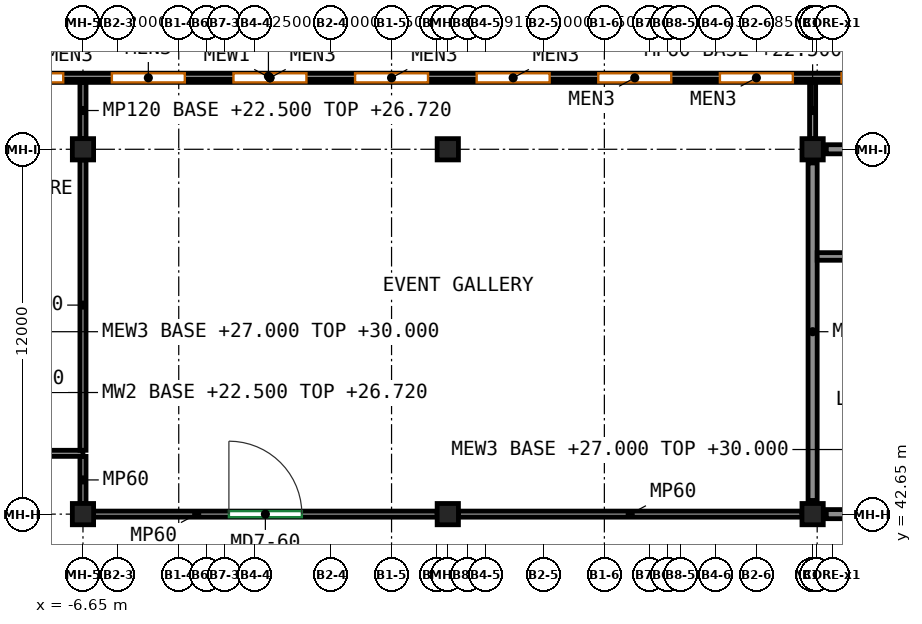
"""IFC4 building model, lengths in metres.
Left out: names, types, materials, properties, quantities, classifications, styles, units other than length and angle.
Written with IfcOpenShell. Run it as: python <this file> out.ifc"""

import sys

from ifc_helpers import new_model, si_unit, direction, frame, frame_2d, origin, origin_2d, place, context, subcontext, project, spatial, rectangle, extrude, source, transform, mapped, element, fill, save


model = new_model("IFC4")
c1 = context("Model", 3, precision=1e-05, world=origin(), true_north=direction((0.0, 1.0)))
c2 = subcontext(c1, "Body", "Model", "MODEL_VIEW")
j1 = project(units=[si_unit("LENGTHUNIT", "METRE"), si_unit("PLANEANGLEUNIT", "RADIAN")], contexts=[c1])
p1 = place(None, origin())
s1 = spatial("IfcSite", under=j1, at=p1, CompositionType="ELEMENT")
p2 = place(p1, origin())
s2 = spatial("IfcBuilding", under=s1, at=p2, CompositionType="ELEMENT")
p3 = place(p2, frame((0.0, 0.0, 22.5)))
s3 = spatial("IfcBuildingStorey", under=s2, at=p3, CompositionType="ELEMENT", Elevation=22.5)
m1 = source(origin(), c2, "Body", "SweptSolid", [
    extrude(rectangle(XDim=0.7, YDim=0.7, at=origin_2d()), origin(), (0.0, 0.0, 1.0), 4.22),
])
for number, where, z_axis, x_axis in (
    (1, (-6.65, 42.65, 0.0), (0.0, 0.0, 1.0), (1.0, 0.0, 0.0)),
    (2, (-6.65, 54.65, 0.0), (0.0, 0.0, 1.0), (1.0, 0.0, 0.0)),
    (3, (5.35, 42.65, 0.0), (0.0, 0.0, 1.0), (1.0, 0.0, 0.0)),
    (4, (5.35, 54.65, 0.0), (0.0, 0.0, 1.0), (1.0, 0.0, 0.0)),
    (5, (17.35, 42.65, 0.0), (0.0, 0.0, 1.0), (1.0, 0.0, 0.0)),
    (6, (17.35, 54.65, 0.0), (0.0, 0.0, 1.0), (1.0, 0.0, 0.0)),
):
    element("IfcColumn", number, at=place(p3, frame(where, z_axis=z_axis, x_axis=x_axis)), inside=s3, PredefinedType="COLUMN", context=c2, shape_type="MappedRepresentation", body=[
        mapped(m1, transform((0.0, 0.0, 0.0))),
    ])
m2 = source(origin(), c2, "Body", "SweptSolid", [
    extrude(rectangle(XDim=12.4, YDim=0.3, at=frame_2d((6.2, 0.0))), origin(), (0.0, 0.0, 1.0), 3.42),
])
p4 = place(p3, frame((30.2, 54.65, 0.0), z_axis=(0.0, 0.0, 1.0), x_axis=(-1.0, 0.0, 0.0)))
e7 = element("IfcWall", 7, at=p4, inside=s3, PredefinedType="SHEAR", context=c2, shape_type="MappedRepresentation", body=[
    mapped(m2, transform((0.0, 0.0, 0.0))),
])
p5 = place(p4, frame((5.7, 0.0, 0.0)))
e8 = element("IfcOpeningElement", 8, at=p5, cuts=e7, PredefinedType="OPENING", context=c2, shape_type="SweptSolid", body=[
    extrude(rectangle(XDim=1.0, YDim=2.1, at=frame_2d((0.5, 1.05))), frame((0.0, 0.16, 0.0), z_axis=(0.0, -1.0, 0.0), x_axis=(1.0, 0.0, 0.0)), (0.0, 0.0, 1.0), 0.32),
])
p6 = place(p3, frame((30.2, 42.65, 0.0), z_axis=(0.0, 0.0, 1.0), x_axis=(-1.0, 0.0, 0.0)))
e9 = element("IfcWall", 9, at=p6, inside=s3, PredefinedType="SHEAR", context=c2, shape_type="MappedRepresentation", body=[
    mapped(m2, transform((0.0, 0.0, 0.0))),
])
p7 = place(p6, frame((5.2, 0.0, 0.0)))
e10 = element("IfcOpeningElement", 10, at=p7, cuts=e9, PredefinedType="OPENING", context=c2, shape_type="SweptSolid", body=[
    extrude(rectangle(XDim=2.0, YDim=2.4, at=frame_2d((1.0, 1.2))), frame((0.0, 0.16, 0.0), z_axis=(0.0, -1.0, 0.0), x_axis=(1.0, 0.0, 0.0)), (0.0, 0.0, 1.0), 0.32),
])
m3 = source(origin(), c2, "Body", "SweptSolid", [
    extrude(rectangle(XDim=11.1, YDim=0.3, at=frame_2d((5.55, 0.0))), origin(), (0.0, 0.0, 1.0), 3.42),
])
p8 = place(p3, frame((17.35, 54.2, 0.0), z_axis=(0.0, 0.0, 1.0), x_axis=(0.0, -1.0, 0.0)))
e11 = element("IfcWall", 11, at=p8, inside=s3, PredefinedType="SHEAR", context=c2, shape_type="MappedRepresentation", body=[
    mapped(m3, transform((0.0, 0.0, 0.0))),
])
m4 = source(origin(), c2, "Body", "SweptSolid", [
    extrude(rectangle(XDim=4.15, YDim=0.25, at=frame_2d((2.075, 0.0))), origin(), (0.0, 0.0, 1.0), 4.22),
])
p9 = place(p3, frame((21.65, 51.125, 0.0), z_axis=(0.0, 0.0, 1.0), x_axis=(-1.0, 0.0, 0.0)))
e12 = element("IfcWall", 12, at=p9, inside=s3, PredefinedType="SHEAR", context=c2, shape_type="MappedRepresentation", body=[
    mapped(m4, transform((0.0, 0.0, 0.0))),
])
p10 = place(p9, frame((1.4, 0.0, 0.0)))
e13 = element("IfcOpeningElement", 13, at=p10, cuts=e12, PredefinedType="OPENING", context=c2, shape_type="SweptSolid", body=[
    extrude(rectangle(XDim=1.1, YDim=2.1, at=frame_2d((0.55, 1.05))), frame((0.0, 0.135, 0.0), z_axis=(0.0, -1.0, 0.0), x_axis=(1.0, 0.0, 0.0)), (0.0, 0.0, 1.0), 0.27),
])
m5 = source(origin(), c2, "Body", "SweptSolid", [
    extrude(rectangle(XDim=112.7, YDim=0.3, at=frame_2d((56.35, 0.0))), origin(), (0.0, 0.0, 1.0), 4.22),
])
p11 = place(p3, frame((-56.85, 57.0, 0.0), z_axis=(0.0, 0.0, 1.0), x_axis=(1.0, 0.0, 0.0)))
e14 = element("IfcWall", 14, at=p11, inside=s3, PredefinedType="SOLIDWALL", context=c2, shape_type="MappedRepresentation", body=[
    mapped(m5, transform((0.0, 0.0, 0.0))),
])
p12 = place(p11, frame((3.15, 0.0, 0.9)))
e15 = element("IfcOpeningElement", 15, at=p12, cuts=e14, PredefinedType="OPENING", context=c2, shape_type="SweptSolid", body=[
    extrude(rectangle(XDim=2.4, YDim=1.8, at=frame_2d((1.2, 0.9))), frame((0.0, 0.16, 0.0), z_axis=(0.0, -1.0, 0.0), x_axis=(1.0, 0.0, 0.0)), (0.0, 0.0, 1.0), 0.32),
])
p13 = place(p11, frame((7.15, 0.0, 0.9)))
e16 = element("IfcOpeningElement", 16, at=p13, cuts=e14, PredefinedType="OPENING", context=c2, shape_type="SweptSolid", body=[
    extrude(rectangle(XDim=2.4, YDim=1.8, at=frame_2d((1.2, 0.9))), frame((0.0, 0.16, 0.0), z_axis=(0.0, -1.0, 0.0), x_axis=(1.0, 0.0, 0.0)), (0.0, 0.0, 1.0), 0.32),
])
p14 = place(p11, frame((11.15, 0.0, 0.9)))
e17 = element("IfcOpeningElement", 17, at=p14, cuts=e14, PredefinedType="OPENING", context=c2, shape_type="SweptSolid", body=[
    extrude(rectangle(XDim=2.4, YDim=1.8, at=frame_2d((1.2, 0.9))), frame((0.0, 0.16, 0.0), z_axis=(0.0, -1.0, 0.0), x_axis=(1.0, 0.0, 0.0)), (0.0, 0.0, 1.0), 0.32),
])
p15 = place(p11, frame((15.15, 0.0, 0.9)))
e18 = element("IfcOpeningElement", 18, at=p15, cuts=e14, PredefinedType="OPENING", context=c2, shape_type="SweptSolid", body=[
    extrude(rectangle(XDim=2.4, YDim=1.8, at=frame_2d((1.2, 0.9))), frame((0.0, 0.16, 0.0), z_axis=(0.0, -1.0, 0.0), x_axis=(1.0, 0.0, 0.0)), (0.0, 0.0, 1.0), 0.32),
])
p16 = place(p11, frame((19.15, 0.0, 0.9)))
e19 = element("IfcOpeningElement", 19, at=p16, cuts=e14, PredefinedType="OPENING", context=c2, shape_type="SweptSolid", body=[
    extrude(rectangle(XDim=2.4, YDim=1.8, at=frame_2d((1.2, 0.9))), frame((0.0, 0.16, 0.0), z_axis=(0.0, -1.0, 0.0), x_axis=(1.0, 0.0, 0.0)), (0.0, 0.0, 1.0), 0.32),
])
p17 = place(p11, frame((23.15, 0.0, 0.9)))
e20 = element("IfcOpeningElement", 20, at=p17, cuts=e14, PredefinedType="OPENING", context=c2, shape_type="SweptSolid", body=[
    extrude(rectangle(XDim=2.4, YDim=1.8, at=frame_2d((1.2, 0.9))), frame((0.0, 0.16, 0.0), z_axis=(0.0, -1.0, 0.0), x_axis=(1.0, 0.0, 0.0)), (0.0, 0.0, 1.0), 0.32),
])
p18 = place(p11, frame((27.15, 0.0, 0.9)))
e21 = element("IfcOpeningElement", 21, at=p18, cuts=e14, PredefinedType="OPENING", context=c2, shape_type="SweptSolid", body=[
    extrude(rectangle(XDim=2.4, YDim=1.8, at=frame_2d((1.2, 0.9))), frame((0.0, 0.16, 0.0), z_axis=(0.0, -1.0, 0.0), x_axis=(1.0, 0.0, 0.0)), (0.0, 0.0, 1.0), 0.32),
])
p19 = place(p11, frame((31.15, 0.0, 0.9)))
e22 = element("IfcOpeningElement", 22, at=p19, cuts=e14, PredefinedType="OPENING", context=c2, shape_type="SweptSolid", body=[
    extrude(rectangle(XDim=2.4, YDim=1.8, at=frame_2d((1.2, 0.9))), frame((0.0, 0.16, 0.0), z_axis=(0.0, -1.0, 0.0), x_axis=(1.0, 0.0, 0.0)), (0.0, 0.0, 1.0), 0.32),
])
p20 = place(p11, frame((35.15, 0.0, 0.9)))
e23 = element("IfcOpeningElement", 23, at=p20, cuts=e14, PredefinedType="OPENING", context=c2, shape_type="SweptSolid", body=[
    extrude(rectangle(XDim=2.4, YDim=1.8, at=frame_2d((1.2, 0.9))), frame((0.0, 0.16, 0.0), z_axis=(0.0, -1.0, 0.0), x_axis=(1.0, 0.0, 0.0)), (0.0, 0.0, 1.0), 0.32),
])
p21 = place(p11, frame((43.15, 0.0, 0.9)))
e24 = element("IfcOpeningElement", 24, at=p21, cuts=e14, PredefinedType="OPENING", context=c2, shape_type="SweptSolid", body=[
    extrude(rectangle(XDim=2.4, YDim=1.8, at=frame_2d((1.2, 0.9))), frame((0.0, 0.16, 0.0), z_axis=(0.0, -1.0, 0.0), x_axis=(1.0, 0.0, 0.0)), (0.0, 0.0, 1.0), 0.32),
])
p22 = place(p11, frame((47.15, 0.0, 0.9)))
e25 = element("IfcOpeningElement", 25, at=p22, cuts=e14, PredefinedType="OPENING", context=c2, shape_type="SweptSolid", body=[
    extrude(rectangle(XDim=2.4, YDim=1.8, at=frame_2d((1.2, 0.9))), frame((0.0, 0.16, 0.0), z_axis=(0.0, -1.0, 0.0), x_axis=(1.0, 0.0, 0.0)), (0.0, 0.0, 1.0), 0.32),
])
p23 = place(p11, frame((51.15, 0.0, 0.9)))
e26 = element("IfcOpeningElement", 26, at=p23, cuts=e14, PredefinedType="OPENING", context=c2, shape_type="SweptSolid", body=[
    extrude(rectangle(XDim=2.4, YDim=1.8, at=frame_2d((1.2, 0.9))), frame((0.0, 0.16, 0.0), z_axis=(0.0, -1.0, 0.0), x_axis=(1.0, 0.0, 0.0)), (0.0, 0.0, 1.0), 0.32),
])
p24 = place(p11, frame((55.15, 0.0, 0.9)))
e27 = element("IfcOpeningElement", 27, at=p24, cuts=e14, PredefinedType="OPENING", context=c2, shape_type="SweptSolid", body=[
    extrude(rectangle(XDim=2.4, YDim=1.8, at=frame_2d((1.2, 0.9))), frame((0.0, 0.16, 0.0), z_axis=(0.0, -1.0, 0.0), x_axis=(1.0, 0.0, 0.0)), (0.0, 0.0, 1.0), 0.32),
])
p25 = place(p11, frame((59.15, 0.0, 0.9)))
e28 = element("IfcOpeningElement", 28, at=p25, cuts=e14, PredefinedType="OPENING", context=c2, shape_type="SweptSolid", body=[
    extrude(rectangle(XDim=2.4, YDim=1.8, at=frame_2d((1.2, 0.9))), frame((0.0, 0.16, 0.0), z_axis=(0.0, -1.0, 0.0), x_axis=(1.0, 0.0, 0.0)), (0.0, 0.0, 1.0), 0.32),
])
p26 = place(p11, frame((63.15, 0.0, 0.9)))
e29 = element("IfcOpeningElement", 29, at=p26, cuts=e14, PredefinedType="OPENING", context=c2, shape_type="SweptSolid", body=[
    extrude(rectangle(XDim=2.4, YDim=1.8, at=frame_2d((1.2, 0.9))), frame((0.0, 0.16, 0.0), z_axis=(0.0, -1.0, 0.0), x_axis=(1.0, 0.0, 0.0)), (0.0, 0.0, 1.0), 0.32),
])
p27 = place(p11, frame((67.15, 0.0, 0.9)))
e30 = element("IfcOpeningElement", 30, at=p27, cuts=e14, PredefinedType="OPENING", context=c2, shape_type="SweptSolid", body=[
    extrude(rectangle(XDim=2.4, YDim=1.8, at=frame_2d((1.2, 0.9))), frame((0.0, 0.16, 0.0), z_axis=(0.0, -1.0, 0.0), x_axis=(1.0, 0.0, 0.0)), (0.0, 0.0, 1.0), 0.32),
])
p28 = place(p11, frame((71.15, 0.0, 0.9)))
e31 = element("IfcOpeningElement", 31, at=p28, cuts=e14, PredefinedType="OPENING", context=c2, shape_type="SweptSolid", body=[
    extrude(rectangle(XDim=2.4, YDim=1.8, at=frame_2d((1.2, 0.9))), frame((0.0, 0.16, 0.0), z_axis=(0.0, -1.0, 0.0), x_axis=(1.0, 0.0, 0.0)), (0.0, 0.0, 1.0), 0.32),
])
p29 = place(p11, frame((75.15, 0.0, 0.9)))
e32 = element("IfcOpeningElement", 32, at=p29, cuts=e14, PredefinedType="OPENING", context=c2, shape_type="SweptSolid", body=[
    extrude(rectangle(XDim=2.4, YDim=1.8, at=frame_2d((1.2, 0.9))), frame((0.0, 0.16, 0.0), z_axis=(0.0, -1.0, 0.0), x_axis=(1.0, 0.0, 0.0)), (0.0, 0.0, 1.0), 0.32),
])
p30 = place(p11, frame((79.15, 0.0, 0.9)))
e33 = element("IfcOpeningElement", 33, at=p30, cuts=e14, PredefinedType="OPENING", context=c2, shape_type="SweptSolid", body=[
    extrude(rectangle(XDim=2.4, YDim=1.8, at=frame_2d((1.2, 0.9))), frame((0.0, 0.16, 0.0), z_axis=(0.0, -1.0, 0.0), x_axis=(1.0, 0.0, 0.0)), (0.0, 0.0, 1.0), 0.32),
])
p31 = place(p11, frame((83.15, 0.0, 0.9)))
e34 = element("IfcOpeningElement", 34, at=p31, cuts=e14, PredefinedType="OPENING", context=c2, shape_type="SweptSolid", body=[
    extrude(rectangle(XDim=2.4, YDim=1.8, at=frame_2d((1.2, 0.9))), frame((0.0, 0.16, 0.0), z_axis=(0.0, -1.0, 0.0), x_axis=(1.0, 0.0, 0.0)), (0.0, 0.0, 1.0), 0.32),
])
p32 = place(p11, frame((87.15, 0.0, 0.9)))
e35 = element("IfcOpeningElement", 35, at=p32, cuts=e14, PredefinedType="OPENING", context=c2, shape_type="SweptSolid", body=[
    extrude(rectangle(XDim=2.4, YDim=1.8, at=frame_2d((1.2, 0.9))), frame((0.0, 0.16, 0.0), z_axis=(0.0, -1.0, 0.0), x_axis=(1.0, 0.0, 0.0)), (0.0, 0.0, 1.0), 0.32),
])
p33 = place(p11, frame((91.15, 0.0, 0.9)))
e36 = element("IfcOpeningElement", 36, at=p33, cuts=e14, PredefinedType="OPENING", context=c2, shape_type="SweptSolid", body=[
    extrude(rectangle(XDim=2.4, YDim=1.8, at=frame_2d((1.2, 0.9))), frame((0.0, 0.16, 0.0), z_axis=(0.0, -1.0, 0.0), x_axis=(1.0, 0.0, 0.0)), (0.0, 0.0, 1.0), 0.32),
])
p34 = place(p11, frame((95.15, 0.0, 0.9)))
e37 = element("IfcOpeningElement", 37, at=p34, cuts=e14, PredefinedType="OPENING", context=c2, shape_type="SweptSolid", body=[
    extrude(rectangle(XDim=2.4, YDim=1.8, at=frame_2d((1.2, 0.9))), frame((0.0, 0.16, 0.0), z_axis=(0.0, -1.0, 0.0), x_axis=(1.0, 0.0, 0.0)), (0.0, 0.0, 1.0), 0.32),
])
p35 = place(p11, frame((103.15, 0.0, 0.9)))
e38 = element("IfcOpeningElement", 38, at=p35, cuts=e14, PredefinedType="OPENING", context=c2, shape_type="SweptSolid", body=[
    extrude(rectangle(XDim=2.4, YDim=1.8, at=frame_2d((1.2, 0.9))), frame((0.0, 0.16, 0.0), z_axis=(0.0, -1.0, 0.0), x_axis=(1.0, 0.0, 0.0)), (0.0, 0.0, 1.0), 0.32),
])
p36 = place(p11, frame((107.15, 0.0, 0.9)))
e39 = element("IfcOpeningElement", 39, at=p36, cuts=e14, PredefinedType="OPENING", context=c2, shape_type="SweptSolid", body=[
    extrude(rectangle(XDim=2.4, YDim=1.8, at=frame_2d((1.2, 0.9))), frame((0.0, 0.16, 0.0), z_axis=(0.0, -1.0, 0.0), x_axis=(1.0, 0.0, 0.0)), (0.0, 0.0, 1.0), 0.32),
])
m6 = source(origin(), c2, "Body", "SweptSolid", [
    extrude(rectangle(XDim=112.8, YDim=0.2, at=frame_2d((56.4, 0.0))), origin(), (0.0, 0.0, 1.0), 1.1),
])
p37 = place(p3, frame((-56.95, 57.05, 4.5), z_axis=(0.0, 0.0, 1.0), x_axis=(1.0, 0.0, 0.0)))
e40 = element("IfcWall", 40, at=p37, inside=s3, PredefinedType="PARAPET", context=c2, shape_type="MappedRepresentation", body=[
    mapped(m6, transform((0.0, 0.0, 0.0))),
])
m7 = source(origin(), c2, "Body", "SweptSolid", [
    extrude(rectangle(XDim=3.9, YDim=0.2, at=frame_2d((1.95, 0.0))), origin(), (0.0, 0.0, 1.0), 3.42),
])
p38 = place(p3, frame((-10.55, 44.65, 0.0), z_axis=(0.0, 0.0, 1.0), x_axis=(1.0, 0.0, 0.0)))
e41 = element("IfcWall", 41, at=p38, inside=s3, PredefinedType="PARTITIONING", context=c2, shape_type="MappedRepresentation", body=[
    mapped(m7, transform((0.0, 0.0, 0.0))),
])
p39 = place(p38, frame((1.35, 0.0, 0.0)))
e42 = element("IfcOpeningElement", 42, at=p39, cuts=e41, PredefinedType="OPENING", context=c2, shape_type="SweptSolid", body=[
    extrude(rectangle(XDim=1.2, YDim=2.1, at=frame_2d((0.6, 1.05))), frame((0.0, 0.11, 0.0), z_axis=(0.0, -1.0, 0.0), x_axis=(1.0, 0.0, 0.0)), (0.0, 0.0, 1.0), 0.22),
])
m8 = source(origin(), c2, "Body", "SweptSolid", [
    extrude(rectangle(XDim=1.55, YDim=0.2, at=frame_2d((0.775, 0.0))), origin(), (0.0, 0.0, 1.0), 3.42),
])
p40 = place(p3, frame((-6.65, 44.55, 0.0), z_axis=(0.0, 0.0, 1.0), x_axis=(0.0, -1.0, 0.0)))
e43 = element("IfcWall", 43, at=p40, inside=s3, PredefinedType="PARTITIONING", context=c2, shape_type="MappedRepresentation", body=[
    mapped(m8, transform((0.0, 0.0, 0.0))),
])
m9 = source(origin(), c2, "Body", "SweptSolid", [
    extrude(rectangle(XDim=9.55, YDim=0.2, at=frame_2d((4.775, 0.0))), origin(), (0.0, 0.0, 1.0), 3.42),
])
p41 = place(p3, frame((-6.65, 54.3, 0.0), z_axis=(0.0, 0.0, 1.0), x_axis=(0.0, -1.0, 0.0)))
e44 = element("IfcWall", 44, at=p41, inside=s3, PredefinedType="PARTITIONING", context=c2, shape_type="MappedRepresentation", body=[
    mapped(m9, transform((0.0, 0.0, 0.0))),
])
m10 = source(origin(), c2, "Body", "SweptSolid", [
    extrude(rectangle(XDim=1.85, YDim=0.2, at=frame_2d((0.925, 0.0))), origin(), (0.0, 0.0, 1.0), 4.22),
])
p42 = place(p3, frame((-6.65, 56.85, 0.0), z_axis=(0.0, 0.0, 1.0), x_axis=(0.0, -1.0, 0.0)))
e45 = element("IfcWall", 45, at=p42, inside=s3, PredefinedType="PARTITIONING", context=c2, shape_type="MappedRepresentation", body=[
    mapped(m10, transform((0.0, 0.0, 0.0))),
])
m11 = source(origin(), c2, "Body", "SweptSolid", [
    extrude(rectangle(XDim=11.3, YDim=0.2, at=frame_2d((5.65, 0.0))), origin(), (0.0, 0.0, 1.0), 3.42),
])
p43 = place(p3, frame((-6.3, 42.65, 0.0), z_axis=(0.0, 0.0, 1.0), x_axis=(1.0, 0.0, 0.0)))
e46 = element("IfcWall", 46, at=p43, inside=s3, PredefinedType="PARTITIONING", context=c2, shape_type="MappedRepresentation", body=[
    mapped(m11, transform((0.0, 0.0, 0.0))),
])
p44 = place(p43, frame((4.45, 0.0, 0.0)))
e47 = element("IfcOpeningElement", 47, at=p44, cuts=e46, PredefinedType="OPENING", context=c2, shape_type="SweptSolid", body=[
    extrude(rectangle(XDim=2.4, YDim=2.4, at=frame_2d((1.2, 1.2))), frame((0.0, 0.11, 0.0), z_axis=(0.0, -1.0, 0.0), x_axis=(1.0, 0.0, 0.0)), (0.0, 0.0, 1.0), 0.22),
])
p45 = place(p3, frame((5.7, 42.65, 0.0), z_axis=(0.0, 0.0, 1.0), x_axis=(1.0, 0.0, 0.0)))
e48 = element("IfcWall", 48, at=p45, inside=s3, PredefinedType="PARTITIONING", context=c2, shape_type="MappedRepresentation", body=[
    mapped(m11, transform((0.0, 0.0, 0.0))),
])
p46 = place(p3, frame((17.35, 56.85, 0.0), z_axis=(0.0, 0.0, 1.0), x_axis=(0.0, -1.0, 0.0)))
e49 = element("IfcWall", 49, at=p46, inside=s3, PredefinedType="PARTITIONING", context=c2, shape_type="MappedRepresentation", body=[
    mapped(m10, transform((0.0, 0.0, 0.0))),
])
p47 = place(p22, origin())
e50 = element("IfcWindow", 50, at=p47, inside=s3, PartitioningType="SINGLE_PANEL", PredefinedType="WINDOW", context=c2, shape_type="SweptSolid", body=[
    extrude(rectangle(XDim=2.4, YDim=1.8, at=frame_2d((1.2, 0.9))), frame((0.0, 0.03, 0.0), z_axis=(0.0, -1.0, 0.0), x_axis=(1.0, 0.0, 0.0)), (0.0, 0.0, 1.0), 0.06),
])
fill(e25, e50)
p48 = place(p23, origin())
e51 = element("IfcWindow", 51, at=p48, inside=s3, PartitioningType="SINGLE_PANEL", PredefinedType="WINDOW", context=c2, shape_type="SweptSolid", body=[
    extrude(rectangle(XDim=2.4, YDim=1.8, at=frame_2d((1.2, 0.9))), frame((0.0, 0.03, 0.0), z_axis=(0.0, -1.0, 0.0), x_axis=(1.0, 0.0, 0.0)), (0.0, 0.0, 1.0), 0.06),
])
fill(e26, e51)
p49 = place(p24, origin())
e52 = element("IfcWindow", 52, at=p49, inside=s3, PartitioningType="SINGLE_PANEL", PredefinedType="WINDOW", context=c2, shape_type="SweptSolid", body=[
    extrude(rectangle(XDim=2.4, YDim=1.8, at=frame_2d((1.2, 0.9))), frame((0.0, 0.03, 0.0), z_axis=(0.0, -1.0, 0.0), x_axis=(1.0, 0.0, 0.0)), (0.0, 0.0, 1.0), 0.06),
])
fill(e27, e52)
p50 = place(p25, origin())
e53 = element("IfcWindow", 53, at=p50, inside=s3, PartitioningType="SINGLE_PANEL", PredefinedType="WINDOW", context=c2, shape_type="SweptSolid", body=[
    extrude(rectangle(XDim=2.4, YDim=1.8, at=frame_2d((1.2, 0.9))), frame((0.0, 0.03, 0.0), z_axis=(0.0, -1.0, 0.0), x_axis=(1.0, 0.0, 0.0)), (0.0, 0.0, 1.0), 0.06),
])
fill(e28, e53)
p51 = place(p26, origin())
e54 = element("IfcWindow", 54, at=p51, inside=s3, PartitioningType="SINGLE_PANEL", PredefinedType="WINDOW", context=c2, shape_type="SweptSolid", body=[
    extrude(rectangle(XDim=2.4, YDim=1.8, at=frame_2d((1.2, 0.9))), frame((0.0, 0.03, 0.0), z_axis=(0.0, -1.0, 0.0), x_axis=(1.0, 0.0, 0.0)), (0.0, 0.0, 1.0), 0.06),
])
fill(e29, e54)
p52 = place(p27, origin())
e55 = element("IfcWindow", 55, at=p52, inside=s3, PartitioningType="SINGLE_PANEL", PredefinedType="WINDOW", context=c2, shape_type="SweptSolid", body=[
    extrude(rectangle(XDim=2.4, YDim=1.8, at=frame_2d((1.2, 0.9))), frame((0.0, 0.03, 0.0), z_axis=(0.0, -1.0, 0.0), x_axis=(1.0, 0.0, 0.0)), (0.0, 0.0, 1.0), 0.06),
])
fill(e30, e55)
p53 = place(p28, origin())
e56 = element("IfcWindow", 56, at=p53, inside=s3, PartitioningType="SINGLE_PANEL", PredefinedType="WINDOW", context=c2, shape_type="SweptSolid", body=[
    extrude(rectangle(XDim=2.4, YDim=1.8, at=frame_2d((1.2, 0.9))), frame((0.0, 0.03, 0.0), z_axis=(0.0, -1.0, 0.0), x_axis=(1.0, 0.0, 0.0)), (0.0, 0.0, 1.0), 0.06),
])
fill(e31, e56)
p54 = place(p29, origin())
e57 = element("IfcWindow", 57, at=p54, inside=s3, PartitioningType="SINGLE_PANEL", PredefinedType="WINDOW", context=c2, shape_type="SweptSolid", body=[
    extrude(rectangle(XDim=2.4, YDim=1.8, at=frame_2d((1.2, 0.9))), frame((0.0, 0.03, 0.0), z_axis=(0.0, -1.0, 0.0), x_axis=(1.0, 0.0, 0.0)), (0.0, 0.0, 1.0), 0.06),
])
fill(e32, e57)
p55 = place(p44, origin())
e58 = element("IfcDoor", 58, at=p55, inside=s3, OperationType="DOUBLE_DOOR_SINGLE_SWING", PredefinedType="DOOR", context=c2, shape_type="SweptSolid", body=[
    extrude(rectangle(XDim=2.4, YDim=2.4, at=frame_2d((1.2, 1.2))), frame((0.0, 0.025, 0.0), z_axis=(0.0, -1.0, 0.0), x_axis=(1.0, 0.0, 0.0)), (0.0, 0.0, 1.0), 0.05),
])
fill(e47, e58)
save(model, sys.argv[1])
